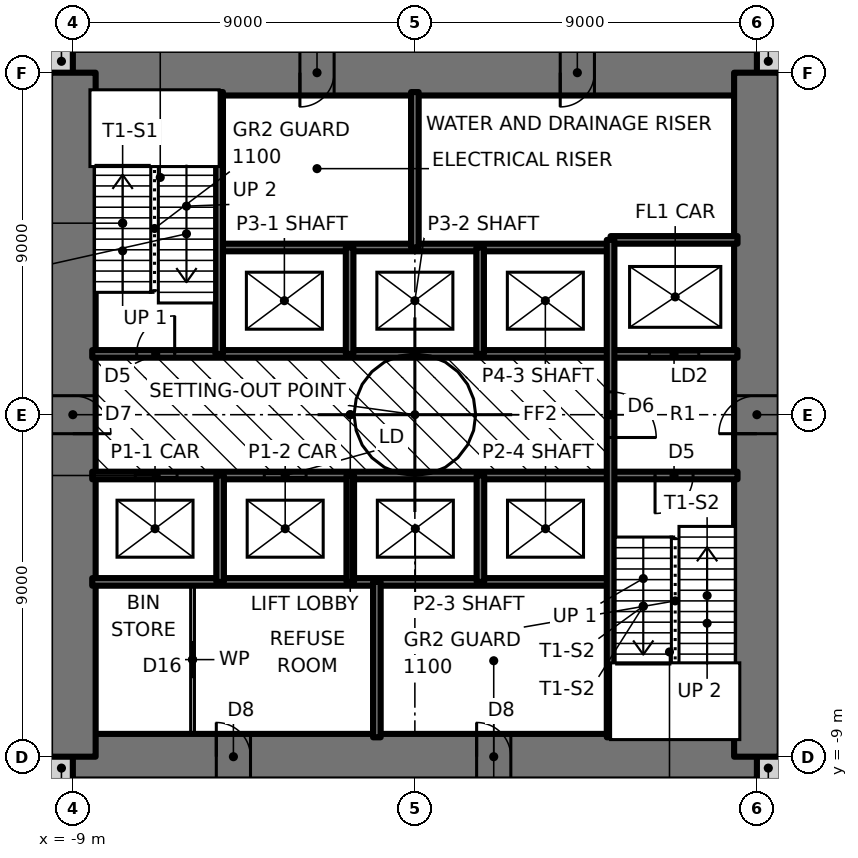
"""IFC4 building model, lengths in metres.
Left out: names, types, materials, properties, quantities, classifications, styles, units other than length and angle.
Written with IfcOpenShell. Run it as: python <this file> out.ifc"""

import sys

from ifc_helpers import new_model, si_unit, direction, frame, frame_2d, origin, place, context, subcontext, project, spatial, rectangle, extrude, element, fill, save


model = new_model("IFC4")
c1 = context("Model", 3, precision=1e-05, world=origin(), true_north=direction((0.0, 1.0)))
c2 = subcontext(c1, "Body", "Model", "MODEL_VIEW")
j1 = project(units=[si_unit("LENGTHUNIT", "METRE"), si_unit("PLANEANGLEUNIT", "RADIAN")], contexts=[c1])
p1 = place(None, origin())
s1 = spatial("IfcSite", under=j1, at=p1, CompositionType="ELEMENT")
p2 = place(p1, origin())
s2 = spatial("IfcBuilding", under=s1, at=p2, CompositionType="ELEMENT")
p3 = place(p2, frame((0.0, 0.0, 6.0)))
s3 = spatial("IfcBuildingStorey", under=s2, at=p3, CompositionType="ELEMENT", Elevation=6.0)
for number, where, z_axis, x_axis in (
    (1, (-9.6, -9.3, 0.0), (0.0, 0.0, 1.0), (1.0, 0.0, 0.0)),
    (2, (9.0, -9.3, 0.0), (0.0, 0.0, 1.0), (1.0, 0.0, 0.0)),
    (3, (9.0, 9.3, 0.0), (0.0, 0.0, 1.0), (1.0, 0.0, 0.0)),
    (4, (-9.6, 9.3, 0.0), (0.0, 0.0, 1.0), (1.0, 0.0, 0.0)),
):
    element("IfcWall", number, at=place(p3, frame(where, z_axis=z_axis, x_axis=x_axis)), inside=s3, PredefinedType="SOLIDWALL", context=c2, shape_type="SweptSolid", body=[
        extrude(rectangle(XDim=0.6, YDim=0.6, at=frame_2d((0.3, 0.0))), origin(), (0.0, 0.0, 1.0), 4.5),
    ])
p4 = place(p3, frame((-9.0, -9.0, 0.0), z_axis=(0.0, 0.0, 1.0), x_axis=(1.0, 0.0, 0.0)))
e5 = element("IfcWall", 5, at=p4, inside=s3, PredefinedType="SHEAR", context=c2, shape_type="SweptSolid", body=[
    extrude(rectangle(XDim=18.0, YDim=1.2, at=frame_2d((9.0, 0.0))), origin(), (0.0, 0.0, 1.0), 4.5),
])
p5 = place(p4, frame((3.775, 0.0, 0.0)))
e6 = element("IfcOpeningElement", 6, at=p5, cuts=e5, PredefinedType="OPENING", context=c2, shape_type="SweptSolid", body=[
    extrude(rectangle(XDim=0.9, YDim=2.1, at=frame_2d((0.45, 1.05))), frame((0.0, 0.61, 0.0), z_axis=(0.0, -1.0, 0.0), x_axis=(1.0, 0.0, 0.0)), (0.0, 0.0, 1.0), 1.22),
])
p6 = place(p4, frame((10.625, 0.0, 0.0)))
e7 = element("IfcOpeningElement", 7, at=p6, cuts=e5, PredefinedType="OPENING", context=c2, shape_type="SweptSolid", body=[
    extrude(rectangle(XDim=0.9, YDim=2.1, at=frame_2d((0.45, 1.05))), frame((0.0, 0.61, 0.0), z_axis=(0.0, -1.0, 0.0), x_axis=(1.0, 0.0, 0.0)), (0.0, 0.0, 1.0), 1.22),
])
p7 = place(p3, frame((9.0, 9.0, 0.0), z_axis=(0.0, 0.0, 1.0), x_axis=(-1.0, 0.0, 0.0)))
e8 = element("IfcWall", 8, at=p7, inside=s3, PredefinedType="SHEAR", context=c2, shape_type="SweptSolid", body=[
    extrude(rectangle(XDim=18.0, YDim=1.2, at=frame_2d((9.0, 0.0))), origin(), (0.0, 0.0, 1.0), 4.5),
])
p8 = place(p7, frame((11.125, 0.0, 0.0)))
e9 = element("IfcOpeningElement", 9, at=p8, cuts=e8, PredefinedType="OPENING", context=c2, shape_type="SweptSolid", body=[
    extrude(rectangle(XDim=0.9, YDim=2.1, at=frame_2d((0.45, 1.05))), frame((0.0, 0.61, 0.0), z_axis=(0.0, -1.0, 0.0), x_axis=(1.0, 0.0, 0.0)), (0.0, 0.0, 1.0), 1.22),
])
p9 = place(p7, frame((4.275, 0.0, 0.0)))
e10 = element("IfcOpeningElement", 10, at=p9, cuts=e8, PredefinedType="OPENING", context=c2, shape_type="SweptSolid", body=[
    extrude(rectangle(XDim=0.9, YDim=2.1, at=frame_2d((0.45, 1.05))), frame((0.0, 0.61, 0.0), z_axis=(0.0, -1.0, 0.0), x_axis=(1.0, 0.0, 0.0)), (0.0, 0.0, 1.0), 1.22),
])
p10 = place(p3, frame((9.0, -9.0, 0.0), z_axis=(0.0, 0.0, 1.0), x_axis=(0.0, 1.0, 0.0)))
e11 = element("IfcWall", 11, at=p10, inside=s3, PredefinedType="SHEAR", context=c2, shape_type="SweptSolid", body=[
    extrude(rectangle(XDim=18.0, YDim=1.2, at=frame_2d((9.0, 0.0))), origin(), (0.0, 0.0, 1.0), 4.5),
])
p11 = place(p10, frame((8.5, 0.0, 0.0)))
e12 = element("IfcOpeningElement", 12, at=p11, cuts=e11, PredefinedType="OPENING", context=c2, shape_type="SweptSolid", body=[
    extrude(rectangle(XDim=1.0, YDim=2.1, at=frame_2d((0.5, 1.05))), frame((0.0, 0.61, 0.0), z_axis=(0.0, -1.0, 0.0), x_axis=(1.0, 0.0, 0.0)), (0.0, 0.0, 1.0), 1.22),
])
p12 = place(p3, frame((-9.0, 9.0, 0.0), z_axis=(0.0, 0.0, 1.0), x_axis=(0.0, -1.0, 0.0)))
e13 = element("IfcWall", 13, at=p12, inside=s3, PredefinedType="SHEAR", context=c2, shape_type="SweptSolid", body=[
    extrude(rectangle(XDim=18.0, YDim=1.2, at=frame_2d((9.0, 0.0))), origin(), (0.0, 0.0, 1.0), 4.5),
])
p13 = place(p12, frame((8.5, 0.0, 0.0)))
e14 = element("IfcOpeningElement", 14, at=p13, cuts=e13, PredefinedType="OPENING", context=c2, shape_type="SweptSolid", body=[
    extrude(rectangle(XDim=1.0, YDim=2.1, at=frame_2d((0.5, 1.05))), frame((0.0, 0.61, 0.0), z_axis=(0.0, -1.0, 0.0), x_axis=(1.0, 0.0, 0.0)), (0.0, 0.0, 1.0), 1.22),
])
p14 = place(p3, frame((-8.49, -4.4, 0.0), z_axis=(0.0, 0.0, 1.0), x_axis=(1.0, 0.0, 0.0)))
e15 = element("IfcWall", 15, at=p14, inside=s3, PredefinedType="SOLIDWALL", context=c2, shape_type="SweptSolid", body=[
    extrude(rectangle(XDim=13.64, YDim=0.2, at=frame_2d((6.82, 0.0))), origin(), (0.0, 0.0, 1.0), 4.5),
])
p15 = place(p3, frame((-8.49, -1.6, 0.0), z_axis=(0.0, 0.0, 1.0), x_axis=(1.0, 0.0, 0.0)))
e16 = element("IfcWall", 16, at=p15, inside=s3, PredefinedType="SOLIDWALL", context=c2, shape_type="SweptSolid", body=[
    extrude(rectangle(XDim=16.98, YDim=0.2, at=frame_2d((8.49, 0.0))), origin(), (0.0, 0.0, 1.0), 4.5),
])
p16 = place(p15, frame((14.81, 0.0, 0.0)))
e17 = element("IfcOpeningElement", 17, at=p16, cuts=e16, PredefinedType="OPENING", context=c2, shape_type="SweptSolid", body=[
    extrude(rectangle(XDim=1.0, YDim=2.1, at=frame_2d((0.5, 1.05))), frame((0.0, 0.11, 0.0), z_axis=(0.0, -1.0, 0.0), x_axis=(1.0, 0.0, 0.0)), (0.0, 0.0, 1.0), 0.22),
])
p17 = place(p15, frame((1.133, 0.0, 0.0)))
e18 = element("IfcOpeningElement", 18, at=p17, cuts=e16, PredefinedType="OPENING", context=c2, shape_type="SweptSolid", body=[
    extrude(rectangle(XDim=1.1, YDim=2.1, at=frame_2d((0.55, 1.05))), frame((0.0, 0.11, 0.0), z_axis=(0.0, -1.0, 0.0), x_axis=(1.0, 0.0, 0.0)), (0.0, 0.0, 1.0), 0.22),
])
p18 = place(p15, frame((4.528, 0.0, 0.0)))
e19 = element("IfcOpeningElement", 19, at=p18, cuts=e16, PredefinedType="OPENING", context=c2, shape_type="SweptSolid", body=[
    extrude(rectangle(XDim=1.1, YDim=2.1, at=frame_2d((0.55, 1.05))), frame((0.0, 0.11, 0.0), z_axis=(0.0, -1.0, 0.0), x_axis=(1.0, 0.0, 0.0)), (0.0, 0.0, 1.0), 0.22),
])
p19 = place(p3, frame((-8.49, 1.6, 0.0), z_axis=(0.0, 0.0, 1.0), x_axis=(1.0, 0.0, 0.0)))
e20 = element("IfcWall", 20, at=p19, inside=s3, PredefinedType="SOLIDWALL", context=c2, shape_type="SweptSolid", body=[
    extrude(rectangle(XDim=16.98, YDim=0.2, at=frame_2d((8.49, 0.0))), origin(), (0.0, 0.0, 1.0), 4.5),
])
p20 = place(p19, frame((1.17, 0.0, 0.0)))
e21 = element("IfcOpeningElement", 21, at=p20, cuts=e20, PredefinedType="OPENING", context=c2, shape_type="SweptSolid", body=[
    extrude(rectangle(XDim=1.0, YDim=2.1, at=frame_2d((0.5, 1.05))), frame((0.0, 0.11, 0.0), z_axis=(0.0, -1.0, 0.0), x_axis=(1.0, 0.0, 0.0)), (0.0, 0.0, 1.0), 0.22),
])
p21 = place(p19, frame((14.66, 0.0, 0.0)))
e22 = element("IfcOpeningElement", 22, at=p21, cuts=e20, PredefinedType="OPENING", context=c2, shape_type="SweptSolid", body=[
    extrude(rectangle(XDim=1.3, YDim=2.1, at=frame_2d((0.65, 1.05))), frame((0.0, 0.11, 0.0), z_axis=(0.0, -1.0, 0.0), x_axis=(1.0, 0.0, 0.0)), (0.0, 0.0, 1.0), 0.22),
])
p22 = place(p3, frame((-5.15, 4.4, 0.0), z_axis=(0.0, 0.0, 1.0), x_axis=(1.0, 0.0, 0.0)))
e23 = element("IfcWall", 23, at=p22, inside=s3, PredefinedType="SOLIDWALL", context=c2, shape_type="SweptSolid", body=[
    extrude(rectangle(XDim=10.3, YDim=0.2, at=frame_2d((5.15, 0.0))), origin(), (0.0, 0.0, 1.0), 4.5),
])
p23 = place(p3, frame((5.15, 4.6, 0.0), z_axis=(0.0, 0.0, 1.0), x_axis=(1.0, 0.0, 0.0)))
e24 = element("IfcWall", 24, at=p23, inside=s3, PredefinedType="SOLIDWALL", context=c2, shape_type="SweptSolid", body=[
    extrude(rectangle(XDim=3.34, YDim=0.2, at=frame_2d((1.67, 0.0))), origin(), (0.0, 0.0, 1.0), 4.5),
])
p24 = place(p3, frame((5.15, -8.49, 0.0), z_axis=(0.0, 0.0, 1.0), x_axis=(0.0, 1.0, 0.0)))
e25 = element("IfcWall", 25, at=p24, inside=s3, PredefinedType="SOLIDWALL", context=c2, shape_type="SweptSolid", body=[
    extrude(rectangle(XDim=13.09, YDim=0.2, at=frame_2d((6.545, 0.0))), origin(), (0.0, 0.0, 1.0), 4.5),
])
p25 = place(p24, frame((7.89, 0.0, 0.0)))
e26 = element("IfcOpeningElement", 26, at=p25, cuts=e25, PredefinedType="OPENING", context=c2, shape_type="SweptSolid", body=[
    extrude(rectangle(XDim=1.2, YDim=2.1, at=frame_2d((0.6, 1.05))), frame((0.0, 0.11, 0.0), z_axis=(0.0, -1.0, 0.0), x_axis=(1.0, 0.0, 0.0)), (0.0, 0.0, 1.0), 0.22),
])
for number, where, z_axis, x_axis in (
    (27, (1.725, -4.4, 0.0), (0.0, 0.0, 1.0), (0.0, 1.0, 0.0)),
    (28, (1.717, 1.6, 0.0), (0.0, 0.0, 1.0), (0.0, 1.0, 0.0)),
):
    element("IfcWall", number, at=place(p3, frame(where, z_axis=z_axis, x_axis=x_axis)), inside=s3, PredefinedType="SOLIDWALL", context=c2, shape_type="SweptSolid", body=[
        extrude(rectangle(XDim=2.8, YDim=0.2, at=frame_2d((1.4, 0.0))), origin(), (0.0, 0.0, 1.0), 4.5),
    ])
for number, where, z_axis, x_axis in (
    (29, (0.0, 4.4, 0.0), (0.0, 0.0, 1.0), (0.0, 1.0, 0.0)),
    (30, (-1.0, -8.49, 0.0), (0.0, 0.0, 1.0), (0.0, 1.0, 0.0)),
):
    element("IfcWall", number, at=place(p3, frame(where, z_axis=z_axis, x_axis=x_axis)), inside=s3, PredefinedType="SOLIDWALL", context=c2, shape_type="SweptSolid", body=[
        extrude(rectangle(XDim=4.09, YDim=0.2, at=frame_2d((2.045, 0.0))), origin(), (0.0, 0.0, 1.0), 4.5),
    ])
for number, where, z_axis, x_axis in (
    (31, (-1.7, -4.4, 0.0), (0.0, 0.0, 1.0), (0.0, 1.0, 0.0)),
    (32, (-1.717, 1.6, 0.0), (0.0, 0.0, 1.0), (0.0, 1.0, 0.0)),
    (33, (-5.125, -4.4, 0.0), (0.0, 0.0, 1.0), (0.0, 1.0, 0.0)),
):
    element("IfcWall", number, at=place(p3, frame(where, z_axis=z_axis, x_axis=x_axis)), inside=s3, PredefinedType="SOLIDWALL", context=c2, shape_type="SweptSolid", body=[
        extrude(rectangle(XDim=2.8, YDim=0.2, at=frame_2d((1.4, 0.0))), origin(), (0.0, 0.0, 1.0), 4.5),
    ])
p26 = place(p3, frame((-5.15, 1.6, 0.0), z_axis=(0.0, 0.0, 1.0), x_axis=(0.0, 1.0, 0.0)))
e34 = element("IfcWall", 34, at=p26, inside=s3, PredefinedType="SOLIDWALL", context=c2, shape_type="SweptSolid", body=[
    extrude(rectangle(XDim=6.89, YDim=0.2, at=frame_2d((3.445, 0.0))), origin(), (0.0, 0.0, 1.0), 4.5),
])
p27 = place(p3, frame((-5.85, -8.49, 0.0), z_axis=(0.0, 0.0, 1.0), x_axis=(0.0, 1.0, 0.0)))
e35 = element("IfcWall", 35, at=p27, inside=s3, PredefinedType="PARTITIONING", context=c2, shape_type="SweptSolid", body=[
    extrude(rectangle(XDim=4.09, YDim=0.1, at=frame_2d((2.045, 0.0))), origin(), (0.0, 0.0, 1.0), 4.3),
])
p28 = place(p27, frame((1.595, 0.0, 0.0)))
e36 = element("IfcOpeningElement", 36, at=p28, cuts=e35, PredefinedType="OPENING", context=c2, shape_type="SweptSolid", body=[
    extrude(rectangle(XDim=0.9, YDim=2.1, at=frame_2d((0.45, 1.05))), frame((0.0, 0.06, 0.0), z_axis=(0.0, -1.0, 0.0), x_axis=(1.0, 0.0, 0.0)), (0.0, 0.0, 1.0), 0.12),
])
p29 = place(p20, origin())
e37 = element("IfcDoor", 37, at=p29, inside=s3, OperationType="SINGLE_SWING_RIGHT", PredefinedType="DOOR", context=c2, shape_type="SweptSolid", body=[
    extrude(rectangle(XDim=1.0, YDim=2.1, at=frame_2d((0.5, 1.05))), frame((0.0, 0.025, 0.0), z_axis=(0.0, -1.0, 0.0), x_axis=(1.0, 0.0, 0.0)), (0.0, 0.0, 1.0), 0.05),
])
fill(e21, e37)
p30 = place(p16, frame((1.0, 0.0, 0.0), z_axis=(0.0, 0.0, 1.0), x_axis=(-1.0, 0.0, 0.0)))
e38 = element("IfcDoor", 38, at=p30, inside=s3, OperationType="SINGLE_SWING_RIGHT", PredefinedType="DOOR", context=c2, shape_type="SweptSolid", body=[
    extrude(rectangle(XDim=1.0, YDim=2.1, at=frame_2d((0.5, 1.05))), frame((0.0, 0.025, 0.0), z_axis=(0.0, -1.0, 0.0), x_axis=(1.0, 0.0, 0.0)), (0.0, 0.0, 1.0), 0.05),
])
fill(e17, e38)
p31 = place(p25, frame((1.2, 0.0, 0.0), z_axis=(0.0, 0.0, 1.0), x_axis=(-1.0, 0.0, 0.0)))
e39 = element("IfcDoor", 39, at=p31, inside=s3, OperationType="SINGLE_SWING_RIGHT", PredefinedType="DOOR", context=c2, shape_type="SweptSolid", body=[
    extrude(rectangle(XDim=1.2, YDim=2.1, at=frame_2d((0.6, 1.05))), frame((0.0, 0.025, 0.0), z_axis=(0.0, -1.0, 0.0), x_axis=(1.0, 0.0, 0.0)), (0.0, 0.0, 1.0), 0.05),
])
fill(e26, e39)
p32 = place(p28, origin())
e40 = element("IfcDoor", 40, at=p32, inside=s3, OperationType="SLIDING_TO_LEFT", PredefinedType="DOOR", context=c2, shape_type="SweptSolid", body=[
    extrude(rectangle(XDim=0.9, YDim=2.1, at=frame_2d((0.45, 1.05))), frame((0.0, 0.025, 0.0), z_axis=(0.0, -1.0, 0.0), x_axis=(1.0, 0.0, 0.0)), (0.0, 0.0, 1.0), 0.05),
])
fill(e36, e40)
p33 = place(p13, origin())
e41 = element("IfcDoor", 41, at=p33, inside=s3, OperationType="SINGLE_SWING_RIGHT", PredefinedType="DOOR", context=c2, shape_type="SweptSolid", body=[
    extrude(rectangle(XDim=1.0, YDim=2.1, at=frame_2d((0.5, 1.05))), frame((0.0, 0.025, 0.0), z_axis=(0.0, -1.0, 0.0), x_axis=(1.0, 0.0, 0.0)), (0.0, 0.0, 1.0), 0.05),
])
fill(e14, e41)
p34 = place(p11, origin())
e42 = element("IfcDoor", 42, at=p34, inside=s3, OperationType="SINGLE_SWING_LEFT", PredefinedType="DOOR", context=c2, shape_type="SweptSolid", body=[
    extrude(rectangle(XDim=1.0, YDim=2.1, at=frame_2d((0.5, 1.05))), frame((0.0, 0.025, 0.0), z_axis=(0.0, -1.0, 0.0), x_axis=(1.0, 0.0, 0.0)), (0.0, 0.0, 1.0), 0.05),
])
fill(e12, e42)
p35 = place(p8, origin())
e43 = element("IfcDoor", 43, at=p35, inside=s3, OperationType="SINGLE_SWING_RIGHT", PredefinedType="DOOR", context=c2, shape_type="SweptSolid", body=[
    extrude(rectangle(XDim=0.9, YDim=2.1, at=frame_2d((0.45, 1.05))), frame((0.0, 0.025, 0.0), z_axis=(0.0, -1.0, 0.0), x_axis=(1.0, 0.0, 0.0)), (0.0, 0.0, 1.0), 0.05),
])
fill(e9, e43)
p36 = place(p9, origin())
e44 = element("IfcDoor", 44, at=p36, inside=s3, OperationType="SINGLE_SWING_RIGHT", PredefinedType="DOOR", context=c2, shape_type="SweptSolid", body=[
    extrude(rectangle(XDim=0.9, YDim=2.1, at=frame_2d((0.45, 1.05))), frame((0.0, 0.025, 0.0), z_axis=(0.0, -1.0, 0.0), x_axis=(1.0, 0.0, 0.0)), (0.0, 0.0, 1.0), 0.05),
])
fill(e10, e44)
p37 = place(p5, origin())
e45 = element("IfcDoor", 45, at=p37, inside=s3, OperationType="SINGLE_SWING_LEFT", PredefinedType="DOOR", context=c2, shape_type="SweptSolid", body=[
    extrude(rectangle(XDim=0.9, YDim=2.1, at=frame_2d((0.45, 1.05))), frame((0.0, 0.025, 0.0), z_axis=(0.0, -1.0, 0.0), x_axis=(1.0, 0.0, 0.0)), (0.0, 0.0, 1.0), 0.05),
])
fill(e6, e45)
p38 = place(p6, origin())
e46 = element("IfcDoor", 46, at=p38, inside=s3, OperationType="SINGLE_SWING_LEFT", PredefinedType="DOOR", context=c2, shape_type="SweptSolid", body=[
    extrude(rectangle(XDim=0.9, YDim=2.1, at=frame_2d((0.45, 1.05))), frame((0.0, 0.025, 0.0), z_axis=(0.0, -1.0, 0.0), x_axis=(1.0, 0.0, 0.0)), (0.0, 0.0, 1.0), 0.05),
])
fill(e7, e46)
p39 = place(p17, origin())
e47 = element("IfcDoor", 47, at=p39, inside=s3, OperationType="DOUBLE_DOOR_SLIDING", PredefinedType="DOOR", context=c2, shape_type="SweptSolid", body=[
    extrude(rectangle(XDim=1.1, YDim=2.1, at=frame_2d((0.55, 1.05))), frame((0.0, 0.025, 0.0), z_axis=(0.0, -1.0, 0.0), x_axis=(1.0, 0.0, 0.0)), (0.0, 0.0, 1.0), 0.05),
])
fill(e18, e47)
p40 = place(p18, origin())
e48 = element("IfcDoor", 48, at=p40, inside=s3, OperationType="DOUBLE_DOOR_SLIDING", PredefinedType="DOOR", context=c2, shape_type="SweptSolid", body=[
    extrude(rectangle(XDim=1.1, YDim=2.1, at=frame_2d((0.55, 1.05))), frame((0.0, 0.025, 0.0), z_axis=(0.0, -1.0, 0.0), x_axis=(1.0, 0.0, 0.0)), (0.0, 0.0, 1.0), 0.05),
])
fill(e19, e48)
p41 = place(p21, origin())
e49 = element("IfcDoor", 49, at=p41, inside=s3, OperationType="SLIDING_TO_LEFT", PredefinedType="DOOR", context=c2, shape_type="SweptSolid", body=[
    extrude(rectangle(XDim=1.3, YDim=2.1, at=frame_2d((0.65, 1.05))), frame((0.0, 0.025, 0.0), z_axis=(0.0, -1.0, 0.0), x_axis=(1.0, 0.0, 0.0)), (0.0, 0.0, 1.0), 0.05),
])
fill(e22, e49)
save(model, sys.argv[1])
